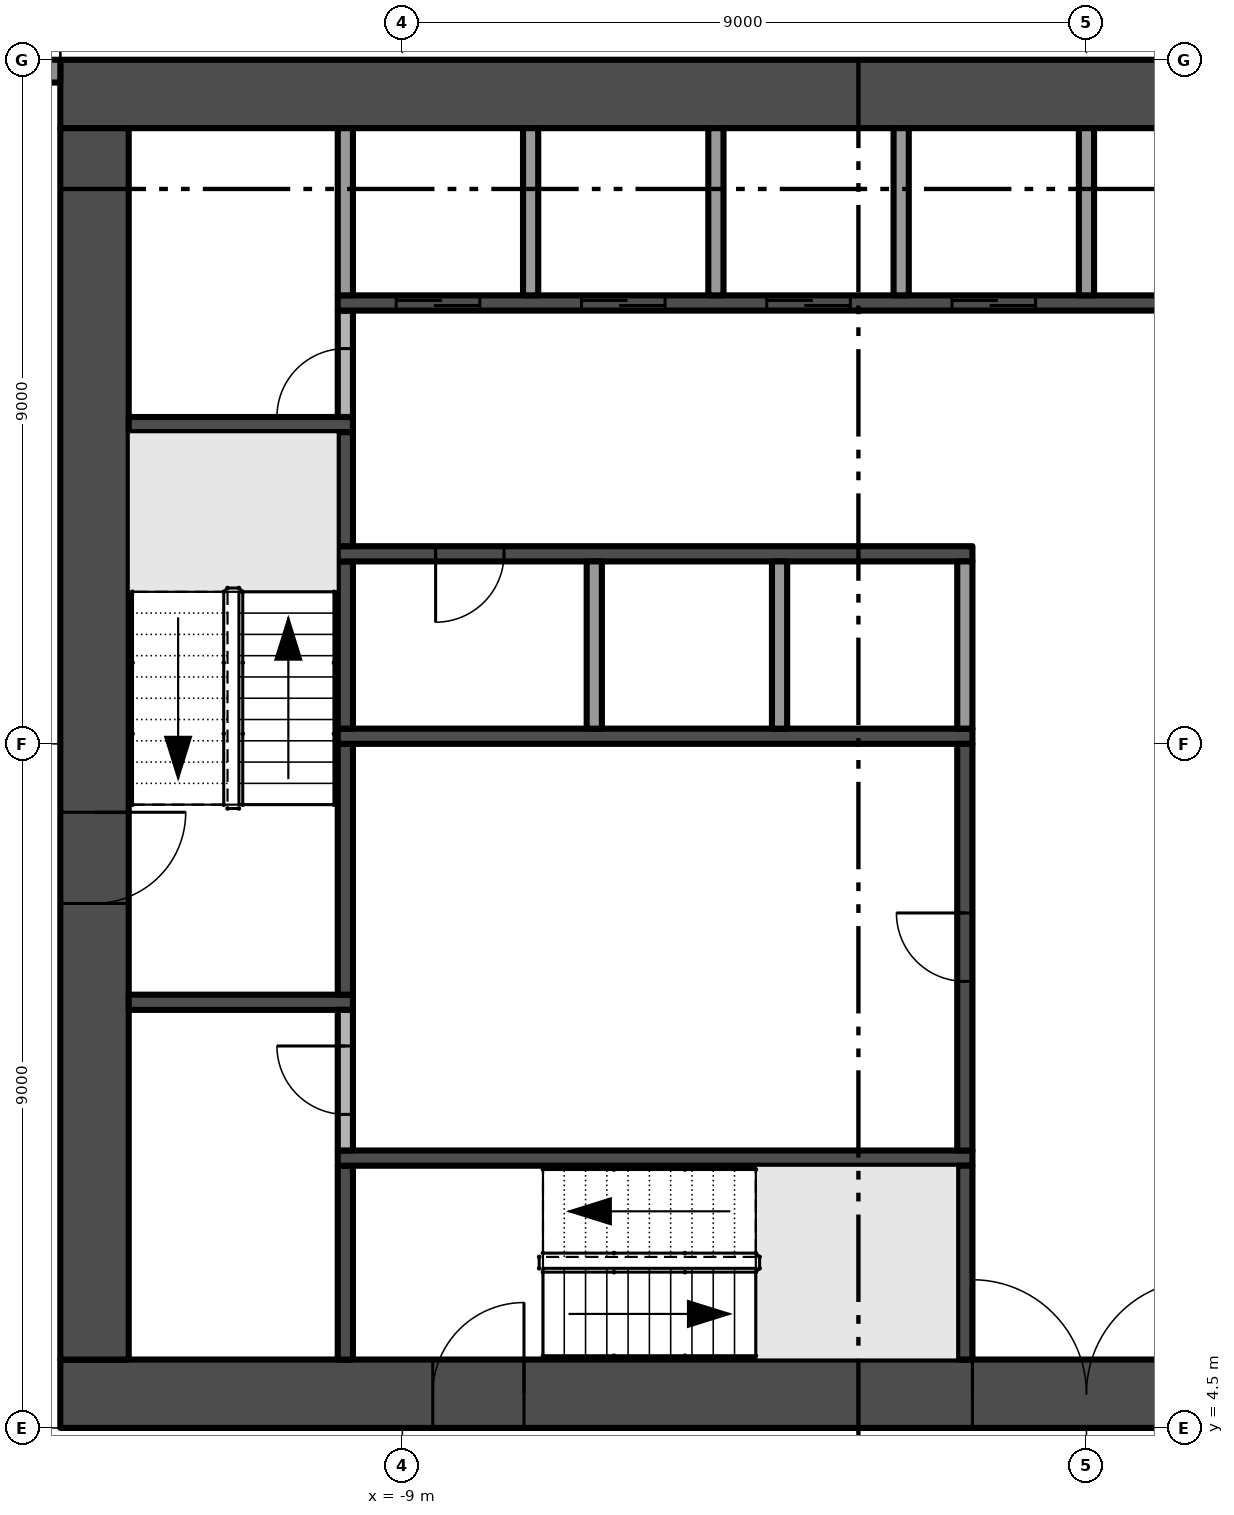
"""IFC4 building model, lengths in metres.
Left out: names, types, materials, properties, quantities, classifications, styles, units other than length and angle.
Written with IfcOpenShell. Run it as: python <this file> out.ifc"""

import sys

from ifc_helpers import new_model, si_unit, direction, frame, frame_2d, origin, place, context, subcontext, project, spatial, rectangle, extrude, element, fill, save


model = new_model("IFC4")
c1 = context("Model", 3, precision=1e-05, world=origin(), true_north=direction((0.0, 1.0)))
c2 = subcontext(c1, "Body", "Model", "MODEL_VIEW")
j1 = project(units=[si_unit("LENGTHUNIT", "METRE"), si_unit("PLANEANGLEUNIT", "RADIAN")], contexts=[c1])
p1 = place(None, origin())
s1 = spatial("IfcSite", under=j1, at=p1, CompositionType="ELEMENT")
p2 = place(p1, origin())
s2 = spatial("IfcBuilding", under=s1, at=p2, CompositionType="ELEMENT")
p3 = place(p2, frame((0.0, 0.0, 73.2)))
s3 = spatial("IfcBuildingStorey", under=s2, at=p3, CompositionType="ELEMENT", Elevation=73.2)
p4 = place(p3, frame((-13.5, 4.95, -0.3), z_axis=(0.0, 0.0, 1.0), x_axis=(1.0, 0.0, 0.0)))
e1 = element("IfcWall", 1, at=p4, inside=s3, PredefinedType="SHEAR", context=c2, shape_type="SweptSolid", body=[
    extrude(rectangle(XDim=27.0, YDim=0.9, at=frame_2d((13.5, 0.0))), origin(), (0.0, 0.0, 1.0), 3.8),
])
p5 = place(p4, frame((12.0, 0.0, 0.3)))
e2 = element("IfcOpeningElement", 2, at=p5, cuts=e1, PredefinedType="OPENING", context=c2, shape_type="SweptSolid", body=[
    extrude(rectangle(XDim=3.0, YDim=2.4, at=frame_2d((1.5, 1.2))), frame((0.0, 0.46, 0.0), z_axis=(0.0, -1.0, 0.0), x_axis=(1.0, 0.0, 0.0)), (0.0, 0.0, 1.0), 0.92),
])
p6 = place(p4, frame((4.9, 0.0, 0.3)))
e3 = element("IfcOpeningElement", 3, at=p6, cuts=e1, PredefinedType="OPENING", context=c2, shape_type="SweptSolid", body=[
    extrude(rectangle(XDim=1.2, YDim=2.2, at=frame_2d((0.6, 1.1))), frame((0.0, 0.46, 0.0), z_axis=(0.0, -1.0, 0.0), x_axis=(1.0, 0.0, 0.0)), (0.0, 0.0, 1.0), 0.92),
])
p7 = place(p4, frame((20.75, 0.0, 0.3)))
e4 = element("IfcOpeningElement", 4, at=p7, cuts=e1, PredefinedType="OPENING", context=c2, shape_type="SweptSolid", body=[
    extrude(rectangle(XDim=1.5, YDim=2.2, at=frame_2d((0.75, 1.1))), frame((0.0, 0.46, 0.0), z_axis=(0.0, -1.0, 0.0), x_axis=(1.0, 0.0, 0.0)), (0.0, 0.0, 1.0), 0.92),
])
p8 = place(p4, frame((17.4, 0.0, 0.3)))
e5 = element("IfcOpeningElement", 5, at=p8, cuts=e1, PredefinedType="OPENING", context=c2, shape_type="SweptSolid", body=[
    extrude(rectangle(XDim=1.2, YDim=2.2, at=frame_2d((0.6, 1.1))), frame((0.0, 0.46, 0.0), z_axis=(0.0, -1.0, 0.0), x_axis=(1.0, 0.0, 0.0)), (0.0, 0.0, 1.0), 0.92),
])
p9 = place(p3, frame((13.5, 22.05, -0.3), z_axis=(0.0, 0.0, 1.0), x_axis=(-1.0, 0.0, 0.0)))
e6 = element("IfcWall", 6, at=p9, inside=s3, PredefinedType="SHEAR", context=c2, shape_type="SweptSolid", body=[
    extrude(rectangle(XDim=27.0, YDim=0.9, at=frame_2d((13.5, 0.0))), origin(), (0.0, 0.0, 1.0), 3.8),
])
p10 = place(p3, frame((-13.05, 21.6, -0.3), z_axis=(0.0, 0.0, 1.0), x_axis=(0.0, -1.0, 0.0)))
e7 = element("IfcWall", 7, at=p10, inside=s3, PredefinedType="SHEAR", context=c2, shape_type="SweptSolid", body=[
    extrude(rectangle(XDim=16.2, YDim=0.9, at=frame_2d((8.1, 0.0))), origin(), (0.0, 0.0, 1.0), 3.8),
])
p11 = place(p10, frame((9.0, 0.0, 0.3)))
e8 = element("IfcOpeningElement", 8, at=p11, cuts=e7, PredefinedType="OPENING", context=c2, shape_type="SweptSolid", body=[
    extrude(rectangle(XDim=1.2, YDim=2.2, at=frame_2d((0.6, 1.1))), frame((0.0, 0.46, 0.0), z_axis=(0.0, -1.0, 0.0), x_axis=(1.0, 0.0, 0.0)), (0.0, 0.0, 1.0), 0.92),
])
p12 = place(p3, frame((-17.325, 22.35, 0.0), z_axis=(0.0, 0.0, 1.0), x_axis=(1.0, 0.0, 0.0)))
e9 = element("IfcWall", 9, at=p12, inside=s3, PredefinedType="SOLIDWALL", context=c2, shape_type="SweptSolid", body=[
    extrude(rectangle(XDim=3.825, YDim=0.3, at=frame_2d((1.913, 0.0))), origin(), (0.0, 0.0, 1.0), 3.5),
])
p13 = place(p12, frame((0.325, 0.0, 0.45)))
e10 = element("IfcOpeningElement", 10, at=p13, cuts=e9, PredefinedType="OPENING", context=c2, shape_type="SweptSolid", body=[
    extrude(rectangle(XDim=2.725, YDim=2.65, at=frame_2d((1.363, 1.325))), frame((0.0, 0.16, 0.0), z_axis=(0.0, -1.0, 0.0), x_axis=(1.0, 0.0, 0.0)), (0.0, 0.0, 1.0), 0.32),
])
for number, where, z_axis, x_axis in (
    (11, (-12.6, 10.1, 0.0), (0.0, 0.0, 1.0), (1.0, 0.0, 0.0)),
    (12, (-12.6, 17.7, 0.0), (0.0, 0.0, 1.0), (1.0, 0.0, 0.0)),
):
    element("IfcWall", number, at=place(p3, frame(where, z_axis=z_axis, x_axis=x_axis)), inside=s3, PredefinedType="SHEAR", context=c2, shape_type="SweptSolid", body=[
        extrude(rectangle(XDim=2.95, YDim=0.2, at=frame_2d((1.475, 0.0))), origin(), (0.0, 0.0, 1.0), 3.5),
    ])
p14 = place(p3, frame((-9.75, 5.4, 0.0), z_axis=(0.0, 0.0, 1.0), x_axis=(0.0, 1.0, 0.0)))
e13 = element("IfcWall", 13, at=p14, inside=s3, PredefinedType="SHEAR", context=c2, shape_type="SweptSolid", body=[
    extrude(rectangle(XDim=2.55, YDim=0.2, at=frame_2d((1.275, 0.0))), origin(), (0.0, 0.0, 1.0), 3.5),
])
p15 = place(p3, frame((-9.85, 8.05, 0.0), z_axis=(0.0, 0.0, 1.0), x_axis=(1.0, 0.0, 0.0)))
e14 = element("IfcWall", 14, at=p15, inside=s3, PredefinedType="SHEAR", context=c2, shape_type="SweptSolid", body=[
    extrude(rectangle(XDim=8.35, YDim=0.2, at=frame_2d((4.175, 0.0))), origin(), (0.0, 0.0, 1.0), 3.5),
])
p16 = place(p3, frame((-9.75, 8.15, 0.0), z_axis=(0.0, 0.0, 1.0), x_axis=(0.0, 1.0, 0.0)))
e15 = element("IfcWall", 15, at=p16, inside=s3, PredefinedType="PARTITIONING", context=c2, shape_type="SweptSolid", body=[
    extrude(rectangle(XDim=1.85, YDim=0.2, at=frame_2d((0.925, 0.0))), origin(), (0.0, 0.0, 1.0), 3.5),
])
p17 = place(p16, frame((0.475, 0.0, 0.0)))
e16 = element("IfcOpeningElement", 16, at=p17, cuts=e15, PredefinedType="OPENING", context=c2, shape_type="SweptSolid", body=[
    extrude(rectangle(XDim=0.9, YDim=2.1, at=frame_2d((0.45, 1.05))), frame((0.0, 0.11, 0.0), z_axis=(0.0, -1.0, 0.0), x_axis=(1.0, 0.0, 0.0)), (0.0, 0.0, 1.0), 0.22),
])
p18 = place(p3, frame((-9.75, 10.2, 0.0), z_axis=(0.0, 0.0, 1.0), x_axis=(0.0, 1.0, 0.0)))
e17 = element("IfcWall", 17, at=p18, inside=s3, PredefinedType="SHEAR", context=c2, shape_type="SweptSolid", body=[
    extrude(rectangle(XDim=3.3, YDim=0.2, at=frame_2d((1.65, 0.0))), origin(), (0.0, 0.0, 1.0), 3.5),
])
p19 = place(p3, frame((-9.85, 13.6, 0.0), z_axis=(0.0, 0.0, 1.0), x_axis=(1.0, 0.0, 0.0)))
e18 = element("IfcWall", 18, at=p19, inside=s3, PredefinedType="SHEAR", context=c2, shape_type="SweptSolid", body=[
    extrude(rectangle(XDim=8.35, YDim=0.2, at=frame_2d((4.175, 0.0))), origin(), (0.0, 0.0, 1.0), 3.5),
])
p20 = place(p3, frame((-9.75, 13.7, 0.0), z_axis=(0.0, 0.0, 1.0), x_axis=(0.0, 1.0, 0.0)))
e19 = element("IfcWall", 19, at=p20, inside=s3, PredefinedType="SHEAR", context=c2, shape_type="SweptSolid", body=[
    extrude(rectangle(XDim=2.2, YDim=0.2, at=frame_2d((1.1, 0.0))), origin(), (0.0, 0.0, 1.0), 3.5),
])
p21 = place(p3, frame((-1.5, 16.0, 0.0), z_axis=(0.0, 0.0, 1.0), x_axis=(-1.0, 0.0, 0.0)))
e20 = element("IfcWall", 20, at=p21, inside=s3, PredefinedType="SHEAR", context=c2, shape_type="SweptSolid", body=[
    extrude(rectangle(XDim=8.35, YDim=0.2, at=frame_2d((4.175, 0.0))), origin(), (0.0, 0.0, 1.0), 3.5),
])
p22 = place(p21, frame((6.162, 0.0, 0.0)))
e21 = element("IfcOpeningElement", 21, at=p22, cuts=e20, PredefinedType="OPENING", context=c2, shape_type="SweptSolid", body=[
    extrude(rectangle(XDim=0.9, YDim=2.1, at=frame_2d((0.45, 1.05))), frame((0.0, 0.11, 0.0), z_axis=(0.0, -1.0, 0.0), x_axis=(1.0, 0.0, 0.0)), (0.0, 0.0, 1.0), 0.22),
])
p23 = place(p3, frame((-9.75, 16.1, 0.0), z_axis=(0.0, 0.0, 1.0), x_axis=(0.0, 1.0, 0.0)))
e22 = element("IfcWall", 22, at=p23, inside=s3, PredefinedType="SHEAR", context=c2, shape_type="SweptSolid", body=[
    extrude(rectangle(XDim=1.5, YDim=0.2, at=frame_2d((0.75, 0.0))), origin(), (0.0, 0.0, 1.0), 3.5),
])
p24 = place(p3, frame((-9.75, 17.8, 0.0), z_axis=(0.0, 0.0, 1.0), x_axis=(0.0, 1.0, 0.0)))
e23 = element("IfcWall", 23, at=p24, inside=s3, PredefinedType="PARTITIONING", context=c2, shape_type="SweptSolid", body=[
    extrude(rectangle(XDim=1.4, YDim=0.2, at=frame_2d((0.7, 0.0))), origin(), (0.0, 0.0, 1.0), 3.5),
])
p25 = place(p24, origin())
e24 = element("IfcOpeningElement", 24, at=p25, cuts=e23, PredefinedType="OPENING", context=c2, shape_type="SweptSolid", body=[
    extrude(rectangle(XDim=0.9, YDim=2.1, at=frame_2d((0.45, 1.05))), frame((0.0, 0.11, 0.0), z_axis=(0.0, -1.0, 0.0), x_axis=(1.0, 0.0, 0.0)), (0.0, 0.0, 1.0), 0.22),
])
p26 = place(p3, frame((-9.85, 19.3, 0.0), z_axis=(0.0, 0.0, 1.0), x_axis=(1.0, 0.0, 0.0)))
e25 = element("IfcWall", 25, at=p26, inside=s3, PredefinedType="SHEAR", context=c2, shape_type="SweptSolid", body=[
    extrude(rectangle(XDim=19.7, YDim=0.2, at=frame_2d((9.85, 0.0))), origin(), (0.0, 0.0, 1.0), 3.5),
])
p27 = place(p26, frame((0.769, 0.0, 0.0)))
e26 = element("IfcOpeningElement", 26, at=p27, cuts=e25, PredefinedType="OPENING", context=c2, shape_type="SweptSolid", body=[
    extrude(rectangle(XDim=1.1, YDim=2.1, at=frame_2d((0.55, 1.05))), frame((0.0, 0.11, 0.0), z_axis=(0.0, -1.0, 0.0), x_axis=(1.0, 0.0, 0.0)), (0.0, 0.0, 1.0), 0.22),
])
p28 = place(p26, frame((3.206, 0.0, 0.0)))
e27 = element("IfcOpeningElement", 27, at=p28, cuts=e25, PredefinedType="OPENING", context=c2, shape_type="SweptSolid", body=[
    extrude(rectangle(XDim=1.1, YDim=2.1, at=frame_2d((0.55, 1.05))), frame((0.0, 0.11, 0.0), z_axis=(0.0, -1.0, 0.0), x_axis=(1.0, 0.0, 0.0)), (0.0, 0.0, 1.0), 0.22),
])
p29 = place(p26, frame((5.644, 0.0, 0.0)))
e28 = element("IfcOpeningElement", 28, at=p29, cuts=e25, PredefinedType="OPENING", context=c2, shape_type="SweptSolid", body=[
    extrude(rectangle(XDim=1.1, YDim=2.1, at=frame_2d((0.55, 1.05))), frame((0.0, 0.11, 0.0), z_axis=(0.0, -1.0, 0.0), x_axis=(1.0, 0.0, 0.0)), (0.0, 0.0, 1.0), 0.22),
])
p30 = place(p26, frame((8.081, 0.0, 0.0)))
e29 = element("IfcOpeningElement", 29, at=p30, cuts=e25, PredefinedType="OPENING", context=c2, shape_type="SweptSolid", body=[
    extrude(rectangle(XDim=1.1, YDim=2.1, at=frame_2d((0.55, 1.05))), frame((0.0, 0.11, 0.0), z_axis=(0.0, -1.0, 0.0), x_axis=(1.0, 0.0, 0.0)), (0.0, 0.0, 1.0), 0.22),
])
for number, where, z_axis, x_axis in (
    (30, (-9.75, 19.4, 0.0), (0.0, 0.0, 1.0), (0.0, 1.0, 0.0)),
    (31, (-7.312, 19.4, 0.0), (0.0, 0.0, 1.0), (0.0, 1.0, 0.0)),
    (32, (-6.475, 13.7, 0.0), (0.0, 0.0, 1.0), (0.0, 1.0, 0.0)),
    (33, (-4.875, 19.4, 0.0), (0.0, 0.0, 1.0), (0.0, 1.0, 0.0)),
    (34, (-4.037, 13.7, 0.0), (0.0, 0.0, 1.0), (0.0, 1.0, 0.0)),
    (35, (-2.438, 19.4, 0.0), (0.0, 0.0, 1.0), (0.0, 1.0, 0.0)),
):
    element("IfcWall", number, at=place(p3, frame(where, z_axis=z_axis, x_axis=x_axis)), inside=s3, PredefinedType="PARTITIONING", context=c2, shape_type="SweptSolid", body=[
        extrude(rectangle(XDim=2.2, YDim=0.2, at=frame_2d((1.1, 0.0))), origin(), (0.0, 0.0, 1.0), 3.5),
    ])
p31 = place(p3, frame((-1.6, 5.4, 0.0), z_axis=(0.0, 0.0, 1.0), x_axis=(0.0, 1.0, 0.0)))
e36 = element("IfcWall", 36, at=p31, inside=s3, PredefinedType="SHEAR", context=c2, shape_type="SweptSolid", body=[
    extrude(rectangle(XDim=2.55, YDim=0.2, at=frame_2d((1.275, 0.0))), origin(), (0.0, 0.0, 1.0), 3.5),
])
p32 = place(p3, frame((-1.6, 8.15, 0.0), z_axis=(0.0, 0.0, 1.0), x_axis=(0.0, 1.0, 0.0)))
e37 = element("IfcWall", 37, at=p32, inside=s3, PredefinedType="SHEAR", context=c2, shape_type="SweptSolid", body=[
    extrude(rectangle(XDim=5.35, YDim=0.2, at=frame_2d((2.675, 0.0))), origin(), (0.0, 0.0, 1.0), 3.5),
])
p33 = place(p32, frame((2.225, 0.0, 0.0)))
e38 = element("IfcOpeningElement", 38, at=p33, cuts=e37, PredefinedType="OPENING", context=c2, shape_type="SweptSolid", body=[
    extrude(rectangle(XDim=0.9, YDim=2.1, at=frame_2d((0.45, 1.05))), frame((0.0, 0.11, 0.0), z_axis=(0.0, -1.0, 0.0), x_axis=(1.0, 0.0, 0.0)), (0.0, 0.0, 1.0), 0.22),
])
for number, where, z_axis, x_axis in (
    (39, (-1.6, 13.7, 0.0), (0.0, 0.0, 1.0), (0.0, 1.0, 0.0)),
    (40, (0.0, 19.4, 0.0), (0.0, 0.0, 1.0), (0.0, 1.0, 0.0)),
):
    element("IfcWall", number, at=place(p3, frame(where, z_axis=z_axis, x_axis=x_axis)), inside=s3, PredefinedType="PARTITIONING", context=c2, shape_type="SweptSolid", body=[
        extrude(rectangle(XDim=2.2, YDim=0.2, at=frame_2d((1.1, 0.0))), origin(), (0.0, 0.0, 1.0), 3.5),
    ])
p34 = place(p5, frame((3.0, 0.0, 0.0), z_axis=(0.0, 0.0, 1.0), x_axis=(-1.0, 0.0, 0.0)))
e41 = element("IfcDoor", 41, at=p34, inside=s3, OperationType="DOUBLE_DOOR_SINGLE_SWING", PredefinedType="DOOR", context=c2, shape_type="SweptSolid", body=[
    extrude(rectangle(XDim=3.0, YDim=2.4, at=frame_2d((1.5, 1.2))), frame((0.0, 0.025, 0.0), z_axis=(0.0, -1.0, 0.0), x_axis=(1.0, 0.0, 0.0)), (0.0, 0.0, 1.0), 0.05),
])
fill(e2, e41)
p35 = place(p11, frame((1.2, 0.0, 0.0), z_axis=(0.0, 0.0, 1.0), x_axis=(-1.0, 0.0, 0.0)))
e42 = element("IfcDoor", 42, at=p35, inside=s3, OperationType="SINGLE_SWING_RIGHT", PredefinedType="DOOR", context=c2, shape_type="SweptSolid", body=[
    extrude(rectangle(XDim=1.2, YDim=2.2, at=frame_2d((0.6, 1.1))), frame((0.0, 0.025, 0.0), z_axis=(0.0, -1.0, 0.0), x_axis=(1.0, 0.0, 0.0)), (0.0, 0.0, 1.0), 0.05),
])
fill(e8, e42)
p36 = place(p6, frame((1.2, 0.0, 0.0), z_axis=(0.0, 0.0, 1.0), x_axis=(-1.0, 0.0, 0.0)))
e43 = element("IfcDoor", 43, at=p36, inside=s3, OperationType="SINGLE_SWING_LEFT", PredefinedType="DOOR", context=c2, shape_type="SweptSolid", body=[
    extrude(rectangle(XDim=1.2, YDim=2.2, at=frame_2d((0.6, 1.1))), frame((0.0, 0.025, 0.0), z_axis=(0.0, -1.0, 0.0), x_axis=(1.0, 0.0, 0.0)), (0.0, 0.0, 1.0), 0.05),
])
fill(e3, e43)
p37 = place(p27, origin())
e44 = element("IfcDoor", 44, at=p37, inside=s3, OperationType="SLIDING_TO_LEFT", PredefinedType="DOOR", context=c2, shape_type="SweptSolid", body=[
    extrude(rectangle(XDim=1.1, YDim=2.1, at=frame_2d((0.55, 1.05))), frame((0.0, 0.025, 0.0), z_axis=(0.0, -1.0, 0.0), x_axis=(1.0, 0.0, 0.0)), (0.0, 0.0, 1.0), 0.05),
])
fill(e26, e44)
p38 = place(p28, origin())
e45 = element("IfcDoor", 45, at=p38, inside=s3, OperationType="SLIDING_TO_LEFT", PredefinedType="DOOR", context=c2, shape_type="SweptSolid", body=[
    extrude(rectangle(XDim=1.1, YDim=2.1, at=frame_2d((0.55, 1.05))), frame((0.0, 0.025, 0.0), z_axis=(0.0, -1.0, 0.0), x_axis=(1.0, 0.0, 0.0)), (0.0, 0.0, 1.0), 0.05),
])
fill(e27, e45)
p39 = place(p29, origin())
e46 = element("IfcDoor", 46, at=p39, inside=s3, OperationType="SLIDING_TO_LEFT", PredefinedType="DOOR", context=c2, shape_type="SweptSolid", body=[
    extrude(rectangle(XDim=1.1, YDim=2.1, at=frame_2d((0.55, 1.05))), frame((0.0, 0.025, 0.0), z_axis=(0.0, -1.0, 0.0), x_axis=(1.0, 0.0, 0.0)), (0.0, 0.0, 1.0), 0.05),
])
fill(e28, e46)
p40 = place(p30, origin())
e47 = element("IfcDoor", 47, at=p40, inside=s3, OperationType="SLIDING_TO_LEFT", PredefinedType="DOOR", context=c2, shape_type="SweptSolid", body=[
    extrude(rectangle(XDim=1.1, YDim=2.1, at=frame_2d((0.55, 1.05))), frame((0.0, 0.025, 0.0), z_axis=(0.0, -1.0, 0.0), x_axis=(1.0, 0.0, 0.0)), (0.0, 0.0, 1.0), 0.05),
])
fill(e29, e47)
p41 = place(p33, origin())
e48 = element("IfcDoor", 48, at=p41, inside=s3, OperationType="SINGLE_SWING_RIGHT", PredefinedType="DOOR", context=c2, shape_type="SweptSolid", body=[
    extrude(rectangle(XDim=0.9, YDim=2.1, at=frame_2d((0.45, 1.05))), frame((0.0, 0.025, 0.0), z_axis=(0.0, -1.0, 0.0), x_axis=(1.0, 0.0, 0.0)), (0.0, 0.0, 1.0), 0.05),
])
fill(e38, e48)
p42 = place(p22, origin())
e49 = element("IfcDoor", 49, at=p42, inside=s3, OperationType="SINGLE_SWING_RIGHT", PredefinedType="DOOR", context=c2, shape_type="SweptSolid", body=[
    extrude(rectangle(XDim=0.9, YDim=2.1, at=frame_2d((0.45, 1.05))), frame((0.0, 0.025, 0.0), z_axis=(0.0, -1.0, 0.0), x_axis=(1.0, 0.0, 0.0)), (0.0, 0.0, 1.0), 0.05),
])
fill(e21, e49)
p43 = place(p25, origin())
e50 = element("IfcDoor", 50, at=p43, inside=s3, OperationType="SINGLE_SWING_LEFT", PredefinedType="DOOR", context=c2, shape_type="SweptSolid", body=[
    extrude(rectangle(XDim=0.9, YDim=2.1, at=frame_2d((0.45, 1.05))), frame((0.0, 0.025, 0.0), z_axis=(0.0, -1.0, 0.0), x_axis=(1.0, 0.0, 0.0)), (0.0, 0.0, 1.0), 0.05),
])
fill(e24, e50)
p44 = place(p17, origin())
e51 = element("IfcDoor", 51, at=p44, inside=s3, OperationType="SINGLE_SWING_RIGHT", PredefinedType="DOOR", context=c2, shape_type="SweptSolid", body=[
    extrude(rectangle(XDim=0.9, YDim=2.1, at=frame_2d((0.45, 1.05))), frame((0.0, 0.025, 0.0), z_axis=(0.0, -1.0, 0.0), x_axis=(1.0, 0.0, 0.0)), (0.0, 0.0, 1.0), 0.05),
])
fill(e16, e51)
save(model, sys.argv[1])
